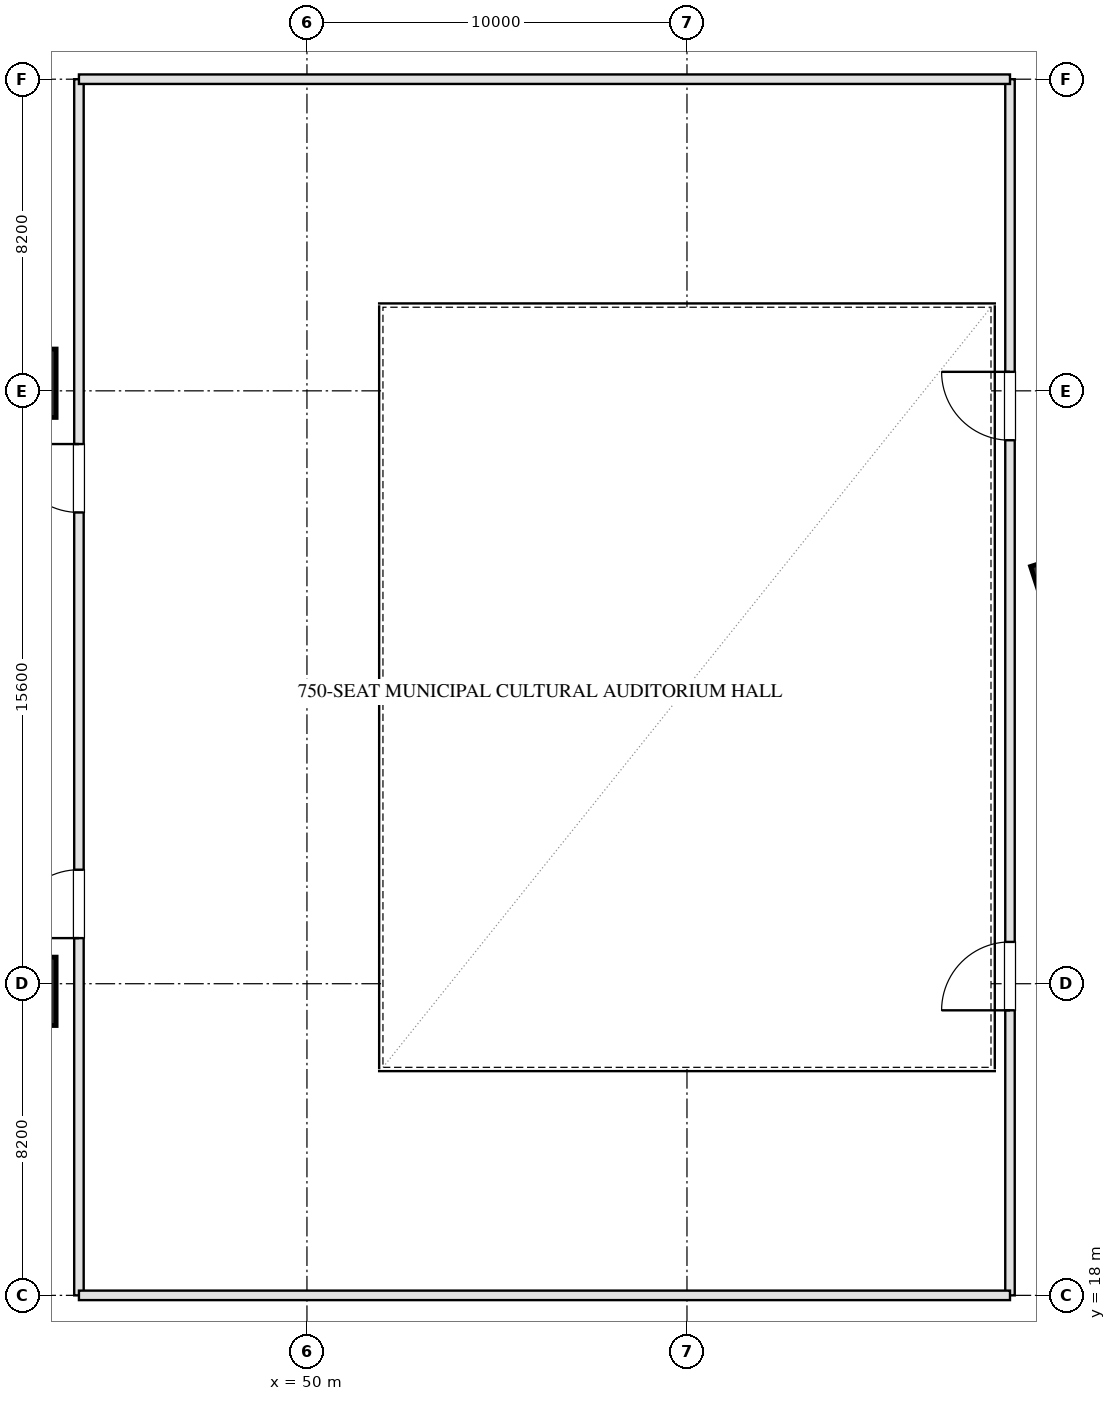
"""IFC4 building model, lengths in metres.
Left out: names, types, materials, properties, quantities, classifications, styles, units other than length and angle.
Written with IfcOpenShell. Run it as: python <this file> out.ifc"""

import sys

from ifc_helpers import new_model, si_unit, direction, frame, frame_2d, origin, origin_2d, place, context, subcontext, project, spatial, rectangle, hollow_rectangle, extrude, element, fill, save


model = new_model("IFC4")
c1 = context("Model", 3, precision=1e-05, world=origin(), true_north=direction((0.0, 1.0)))
c2 = subcontext(c1, "Body", "Model", "MODEL_VIEW")
j1 = project(units=[si_unit("LENGTHUNIT", "METRE"), si_unit("PLANEANGLEUNIT", "RADIAN")], contexts=[c1])
p1 = place(None, origin())
s1 = spatial("IfcSite", under=j1, at=p1, CompositionType="ELEMENT")
p2 = place(p1, origin())
s2 = spatial("IfcBuilding", under=s1, at=p2, CompositionType="ELEMENT")
p3 = place(p2, frame((0.0, 0.0, 6.0)))
s3 = spatial("IfcBuildingStorey", under=s2, at=p3, CompositionType="ELEMENT", Elevation=6.0)
for number, where, z_axis, x_axis in (
    (1, (42.5, 26.0, 0.0), (0.0, 0.0, 1.0), (1.0, 0.0, 0.0)),
    (2, (42.5, 42.0, 0.0), (0.0, 0.0, 1.0), (1.0, 0.0, 0.0)),
):
    element("IfcColumn", number, at=place(p3, frame(where, z_axis=z_axis, x_axis=x_axis)), inside=s3, PredefinedType="COLUMN", context=c2, shape_type="SweptSolid", body=[
        extrude(hollow_rectangle(XDim=1.8, YDim=1.8, WallThickness=0.06, at=origin_2d()), origin(), (0.0, 0.0, 1.0), 5.501),
    ])
p4 = place(p3, frame((69.672, 36.858, 0.0), z_axis=(0.0, 0.0, 1.0), x_axis=(0.951056516295, 0.309016994375, 0.0)))
e3 = element("IfcColumn", 3, at=p4, inside=s3, PredefinedType="COLUMN", context=c2, shape_type="SweptSolid", body=[
    extrude(hollow_rectangle(XDim=1.0, YDim=1.0, WallThickness=0.036, at=origin_2d()), origin(), (0.0, 0.0, 1.0), 5.501),
])
p5 = place(p3, frame((44.0, 18.0, 0.0), z_axis=(0.0, 0.0, 1.0), x_axis=(0.0, 1.0, 0.0)))
e4 = element("IfcWall", 4, at=p5, inside=s3, PredefinedType="PARTITIONING", context=c2, shape_type="SweptSolid", body=[
    extrude(rectangle(XDim=32.0, YDim=0.25, at=frame_2d((16.0, 0.0))), origin(), (0.0, 0.0, 1.0), 5.185),
])
p6 = place(p5, frame((9.4, 0.0, 0.0)))
e5 = element("IfcOpeningElement", 5, at=p6, cuts=e4, PredefinedType="OPENING", context=c2, shape_type="SweptSolid", body=[
    extrude(rectangle(XDim=1.8, YDim=2.05, at=frame_2d((0.9, 1.025))), frame((0.0, 0.135, 0.0), z_axis=(0.0, -1.0, 0.0), x_axis=(1.0, 0.0, 0.0)), (0.0, 0.0, 1.0), 0.27),
])
p7 = place(p5, frame((20.6, 0.0, 0.0)))
e6 = element("IfcOpeningElement", 6, at=p7, cuts=e4, PredefinedType="OPENING", context=c2, shape_type="SweptSolid", body=[
    extrude(rectangle(XDim=1.8, YDim=2.05, at=frame_2d((0.9, 1.025))), frame((0.0, 0.135, 0.0), z_axis=(0.0, -1.0, 0.0), x_axis=(1.0, 0.0, 0.0)), (0.0, 0.0, 1.0), 0.27),
])
p8 = place(p3, frame((68.5, 18.0, 0.0), z_axis=(0.0, 0.0, 1.0), x_axis=(0.0, 1.0, 0.0)))
e7 = element("IfcWall", 7, at=p8, inside=s3, PredefinedType="PARTITIONING", context=c2, shape_type="SweptSolid", body=[
    extrude(rectangle(XDim=32.0, YDim=0.25, at=frame_2d((16.0, 0.0))), origin(), (0.0, 0.0, 1.0), 5.185),
])
p9 = place(p8, frame((7.5, 0.0, 0.0)))
e8 = element("IfcOpeningElement", 8, at=p9, cuts=e7, PredefinedType="OPENING", context=c2, shape_type="SweptSolid", body=[
    extrude(rectangle(XDim=1.8, YDim=2.05, at=frame_2d((0.9, 1.025))), frame((0.0, 0.135, 0.0), z_axis=(0.0, -1.0, 0.0), x_axis=(1.0, 0.0, 0.0)), (0.0, 0.0, 1.0), 0.27),
])
p10 = place(p8, frame((22.5, 0.0, 0.0)))
e9 = element("IfcOpeningElement", 9, at=p10, cuts=e7, PredefinedType="OPENING", context=c2, shape_type="SweptSolid", body=[
    extrude(rectangle(XDim=1.8, YDim=2.05, at=frame_2d((0.9, 1.025))), frame((0.0, 0.135, 0.0), z_axis=(0.0, -1.0, 0.0), x_axis=(1.0, 0.0, 0.0)), (0.0, 0.0, 1.0), 0.27),
])
for number, where, z_axis, x_axis in (
    (10, (44.0, 18.0, 0.0), (0.0, 0.0, 1.0), (1.0, 0.0, 0.0)),
    (11, (44.0, 50.0, 0.0), (0.0, 0.0, 1.0), (1.0, 0.0, 0.0)),
):
    element("IfcWall", number, at=place(p3, frame(where, z_axis=z_axis, x_axis=x_axis)), inside=s3, PredefinedType="PARTITIONING", context=c2, shape_type="SweptSolid", body=[
        extrude(rectangle(XDim=24.5, YDim=0.25, at=frame_2d((12.25, 0.0))), origin(), (0.0, 0.0, 1.0), 5.185),
    ])
p11 = place(p6, origin())
e12 = element("IfcDoor", 12, at=p11, inside=s3, OperationType="SINGLE_SWING_LEFT", PredefinedType="DOOR", context=c2, shape_type="SweptSolid", body=[
    extrude(rectangle(XDim=1.8, YDim=2.05, at=frame_2d((0.9, 1.025))), frame((0.0, 0.025, 0.0), z_axis=(0.0, -1.0, 0.0), x_axis=(1.0, 0.0, 0.0)), (0.0, 0.0, 1.0), 0.05),
])
fill(e5, e12)
p12 = place(p7, origin())
e13 = element("IfcDoor", 13, at=p12, inside=s3, OperationType="SINGLE_SWING_RIGHT", PredefinedType="DOOR", context=c2, shape_type="SweptSolid", body=[
    extrude(rectangle(XDim=1.8, YDim=2.05, at=frame_2d((0.9, 1.025))), frame((0.0, 0.025, 0.0), z_axis=(0.0, -1.0, 0.0), x_axis=(1.0, 0.0, 0.0)), (0.0, 0.0, 1.0), 0.05),
])
fill(e6, e13)
p13 = place(p9, origin())
e14 = element("IfcDoor", 14, at=p13, inside=s3, OperationType="SINGLE_SWING_LEFT", PredefinedType="DOOR", context=c2, shape_type="SweptSolid", body=[
    extrude(rectangle(XDim=1.8, YDim=2.05, at=frame_2d((0.9, 1.025))), frame((0.0, 0.025, 0.0), z_axis=(0.0, -1.0, 0.0), x_axis=(1.0, 0.0, 0.0)), (0.0, 0.0, 1.0), 0.05),
])
fill(e8, e14)
p14 = place(p10, origin())
e15 = element("IfcDoor", 15, at=p14, inside=s3, OperationType="SINGLE_SWING_RIGHT", PredefinedType="DOOR", context=c2, shape_type="SweptSolid", body=[
    extrude(rectangle(XDim=1.8, YDim=2.05, at=frame_2d((0.9, 1.025))), frame((0.0, 0.025, 0.0), z_axis=(0.0, -1.0, 0.0), x_axis=(1.0, 0.0, 0.0)), (0.0, 0.0, 1.0), 0.05),
])
fill(e9, e15)
save(model, sys.argv[1])
